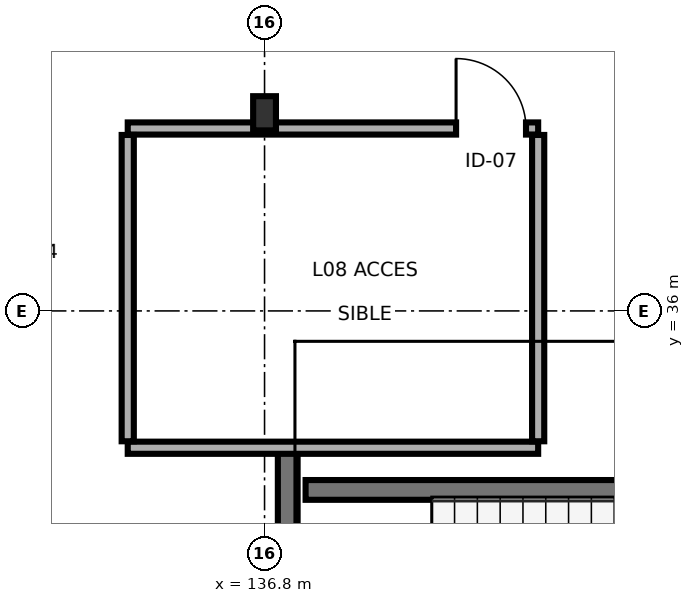
"""IFC4 building model, lengths in metres.
Left out: names, types, materials, properties, quantities, classifications, styles, units other than length and angle.
Written with IfcOpenShell. Run it as: python <this file> out.ifc"""

import sys

from ifc_helpers import new_model, si_unit, direction, frame, frame_2d, origin, origin_2d, place, context, subcontext, project, spatial, rectangle, i_section, extrude, element, fill, save


model = new_model("IFC4")
c1 = context("Model", 3, precision=1e-05, world=origin(), true_north=direction((0.0, 1.0)))
c2 = subcontext(c1, "Body", "Model", "MODEL_VIEW")
j1 = project(units=[si_unit("LENGTHUNIT", "METRE"), si_unit("PLANEANGLEUNIT", "RADIAN")], contexts=[c1])
p1 = place(None, origin())
s1 = spatial("IfcSite", under=j1, at=p1, CompositionType="ELEMENT")
p2 = place(p1, origin())
s2 = spatial("IfcBuilding", under=s1, at=p2, CompositionType="ELEMENT")
p3 = place(p2, frame((0.0, 0.0, 28.3)))
s3 = spatial("IfcBuildingStorey", under=s2, at=p3, CompositionType="ELEMENT", Elevation=28.3)
p4 = place(p3, frame((136.8, 38.6, 0.0), z_axis=(0.0, 0.0, 1.0), x_axis=(1.0, 0.0, 0.0)))
e1 = element("IfcColumn", 1, at=p4, inside=s3, PredefinedType="COLUMN", context=c2, shape_type="SweptSolid", body=[
    extrude(i_section(OverallWidth=0.3, OverallDepth=0.45, WebThickness=0.014, FlangeThickness=0.026, FilletRadius=0.027, at=origin_2d()), origin(), (0.0, 0.0, 1.0), 3.4),
])
p5 = place(p3, frame((137.105, 29.54, 0.0), z_axis=(0.0, 0.0, 1.0), x_axis=(0.0, 1.0, 0.0)))
e2 = element("IfcWall", 2, at=p5, inside=s3, PredefinedType="SHEAR", context=c2, shape_type="SweptSolid", body=[
    extrude(rectangle(XDim=4.635, YDim=0.26, at=frame_2d((2.317, 0.0))), origin(), (0.0, 0.0, 1.0), 3.175),
])
p6 = place(p5, frame((0.61, 0.0, 0.0)))
e3 = element("IfcOpeningElement", 3, at=p6, cuts=e2, PredefinedType="OPENING", context=c2, shape_type="SweptSolid", body=[
    extrude(rectangle(XDim=1.1, YDim=2.2, at=frame_2d((0.55, 1.1))), frame((0.0, 0.14, 0.0), z_axis=(0.0, -1.0, 0.0), x_axis=(1.0, 0.0, 0.0)), (0.0, 0.0, 1.0), 0.28),
])
p7 = place(p3, frame((137.34, 33.645, 0.0), z_axis=(0.0, 0.0, 1.0), x_axis=(1.0, 0.0, 0.0)))
e4 = element("IfcWall", 4, at=p7, inside=s3, PredefinedType="SHEAR", context=c2, shape_type="SweptSolid", body=[
    extrude(rectangle(XDim=8.52, YDim=0.26, at=frame_2d((4.26, 0.0))), origin(), (0.0, 0.0, 1.0), 3.175),
])
p8 = place(p3, frame((135.0, 34.2, 0.0), z_axis=(0.0, 0.0, 1.0), x_axis=(1.0, 0.0, 0.0)))
e5 = element("IfcWall", 5, at=p8, inside=s3, PredefinedType="PARTITIONING", context=c2, shape_type="SweptSolid", body=[
    extrude(rectangle(XDim=5.4, YDim=0.16, at=frame_2d((2.7, 0.0))), origin(), (0.0, 0.0, 1.0), 2.71),
])
p9 = place(p3, frame((135.0, 38.4, 0.0), z_axis=(0.0, 0.0, 1.0), x_axis=(1.0, 0.0, 0.0)))
e6 = element("IfcWall", 6, at=p9, inside=s3, PredefinedType="PARTITIONING", context=c2, shape_type="SweptSolid", body=[
    extrude(rectangle(XDim=5.4, YDim=0.16, at=frame_2d((2.7, 0.0))), origin(), (0.0, 0.0, 1.0), 2.71),
])
p10 = place(p9, frame((4.32, 0.0, 0.0)))
e7 = element("IfcOpeningElement", 7, at=p10, cuts=e6, PredefinedType="OPENING", context=c2, shape_type="SweptSolid", body=[
    extrude(rectangle(XDim=0.92, YDim=2.1, at=frame_2d((0.46, 1.05))), frame((0.0, 0.09, 0.0), z_axis=(0.0, -1.0, 0.0), x_axis=(1.0, 0.0, 0.0)), (0.0, 0.0, 1.0), 0.18),
])
p11 = place(p3, frame((135.0, 34.285, 0.0), z_axis=(0.0, 0.0, 1.0), x_axis=(0.0, 1.0, 0.0)))
e8 = element("IfcWall", 8, at=p11, inside=s3, PredefinedType="PARTITIONING", context=c2, shape_type="SweptSolid", body=[
    extrude(rectangle(XDim=4.03, YDim=0.16, at=frame_2d((2.015, 0.0))), origin(), (0.0, 0.0, 1.0), 2.71),
])
p12 = place(p3, frame((140.4, 34.285, 0.0), z_axis=(0.0, 0.0, 1.0), x_axis=(0.0, 1.0, 0.0)))
e9 = element("IfcWall", 9, at=p12, inside=s3, PredefinedType="PARTITIONING", context=c2, shape_type="SweptSolid", body=[
    extrude(rectangle(XDim=4.03, YDim=0.16, at=frame_2d((2.015, 0.0))), origin(), (0.0, 0.0, 1.0), 3.175),
])
p13 = place(p10, origin())
e10 = element("IfcDoor", 10, at=p13, inside=s3, OperationType="SINGLE_SWING_LEFT", PredefinedType="DOOR", context=c2, shape_type="SweptSolid", body=[
    extrude(rectangle(XDim=0.92, YDim=2.1, at=frame_2d((0.46, 1.05))), frame((0.0, 0.025, 0.0), z_axis=(0.0, -1.0, 0.0), x_axis=(1.0, 0.0, 0.0)), (0.0, 0.0, 1.0), 0.05),
])
fill(e7, e10)
save(model, sys.argv[1])
